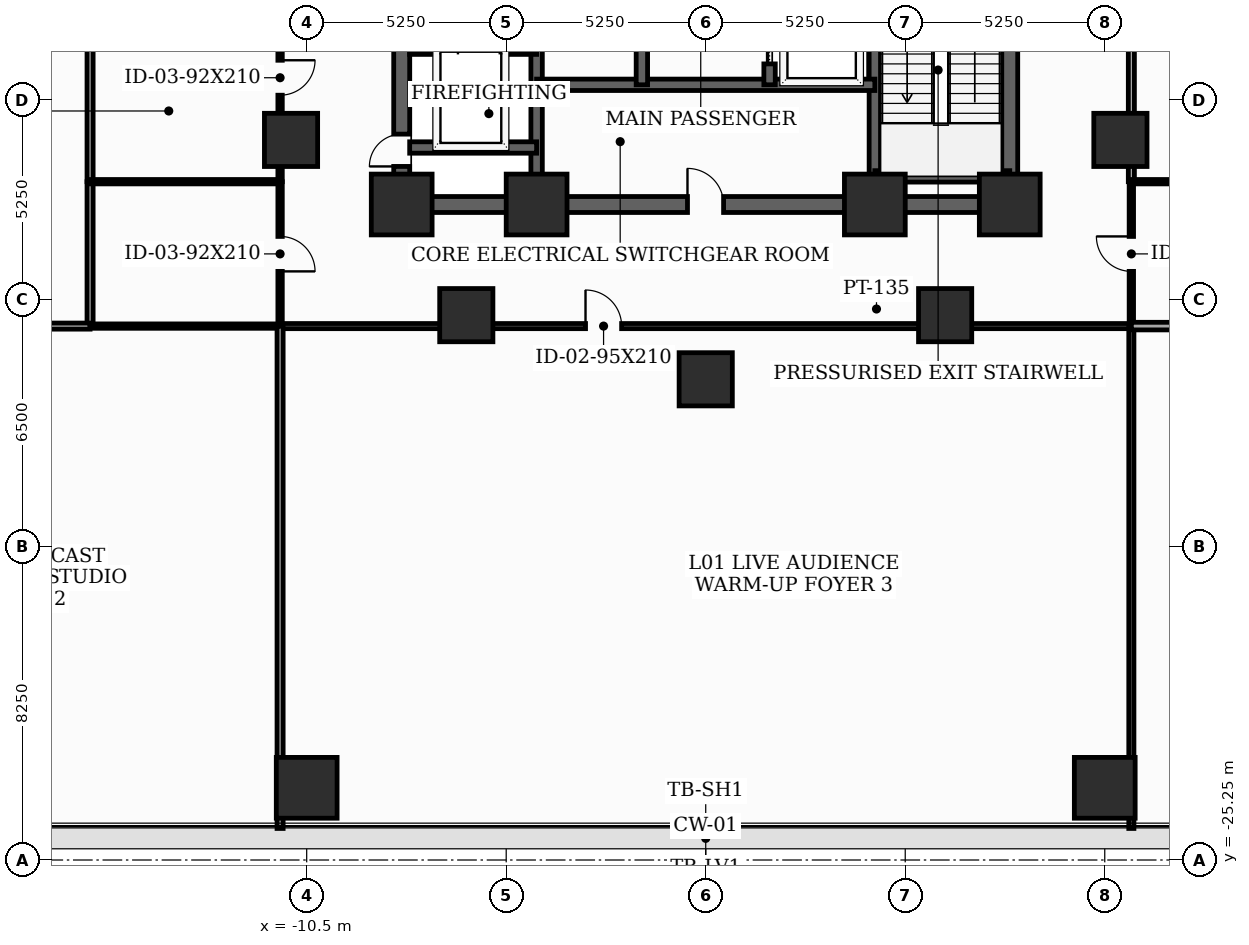
"""IFC4 building model, lengths in metres.
Left out: names, types, materials, properties, quantities, classifications, styles, units other than length and angle.
Written with IfcOpenShell. Run it as: python <this file> out.ifc"""

import sys

from ifc_helpers import new_model, si_unit, direction, frame, frame_2d, origin, origin_2d, place, context, subcontext, project, spatial, rectangle, extrude, element, fill, save


model = new_model("IFC4")
c1 = context("Model", 3, precision=1e-05, world=origin(), true_north=direction((0.0, 1.0)))
c2 = subcontext(c1, "Body", "Model", "MODEL_VIEW")
j1 = project(units=[si_unit("LENGTHUNIT", "METRE"), si_unit("PLANEANGLEUNIT", "RADIAN")], contexts=[c1])
p1 = place(None, origin())
s1 = spatial("IfcSite", under=j1, at=p1, CompositionType="ELEMENT")
p2 = place(p1, origin())
s2 = spatial("IfcBuilding", under=s1, at=p2, CompositionType="ELEMENT")
p3 = place(p2, frame((0.0, 0.0, 5.2)))
s3 = spatial("IfcBuildingStorey", under=s2, at=p3, CompositionType="ELEMENT", Elevation=5.2)
for number, where, z_axis, x_axis in (
    (1, (-8.0, -8.0, 0.0), (0.0, 0.0, 1.0), (1.0, 0.0, 0.0)),
    (2, (-4.45, -8.0, 0.0), (0.0, 0.0, 1.0), (1.0, 0.0, 0.0)),
    (3, (4.45, -8.0, 0.0), (0.0, 0.0, 1.0), (1.0, 0.0, 0.0)),
    (4, (8.0, -8.0, 0.0), (0.0, 0.0, 1.0), (1.0, 0.0, 0.0)),
):
    element("IfcColumn", number, at=place(p3, frame(where, z_axis=z_axis, x_axis=x_axis)), inside=s3, PredefinedType="COLUMN", context=c2, shape_type="SweptSolid", body=[
        extrude(rectangle(XDim=1.6, YDim=1.6, at=origin_2d()), origin(), (0.0, 0.0, 1.0), 5.2),
    ])
for number, where, z_axis, x_axis in (
    (5, (-10.912, -6.3, 0.0), (0.0, 0.0, 1.0), (1.0, 0.0, 0.0)),
    (6, (-6.3, -10.912, 0.0), (0.0, 0.0, 1.0), (1.0, 0.0, 0.0)),
    (7, (0.0, -12.6, 0.0), (0.0, 0.0, 1.0), (1.0, 0.0, 0.0)),
    (8, (6.3, -10.912, 0.0), (0.0, 0.0, 1.0), (1.0, 0.0, 0.0)),
    (9, (10.912, -6.3, 0.0), (0.0, 0.0, 1.0), (1.0, 0.0, 0.0)),
):
    element("IfcColumn", number, at=place(p3, frame(where, z_axis=z_axis, x_axis=x_axis)), inside=s3, PredefinedType="COLUMN", context=c2, shape_type="SweptSolid", body=[
        extrude(rectangle(XDim=1.4, YDim=1.4, at=origin_2d()), origin(), (0.0, 0.0, 1.0), 5.2),
    ])
for number, where, z_axis, x_axis in (
    (10, (-10.5, -23.35, 0.0), (0.0, 0.0, 1.0), (1.0, 0.0, 0.0)),
    (11, (10.5, -23.35, 0.0), (0.0, 0.0, 1.0), (1.0, 0.0, 0.0)),
):
    element("IfcColumn", number, at=place(p3, frame(where, z_axis=z_axis, x_axis=x_axis)), inside=s3, PredefinedType="COLUMN", context=c2, shape_type="SweptSolid", body=[
        extrude(rectangle(XDim=1.6, YDim=1.6, at=origin_2d()), origin(), (0.0, 0.0, 1.0), 5.2),
    ])
p4 = place(p3, frame((-8.0, -8.0, 0.0), z_axis=(0.0, 0.0, 1.0), x_axis=(0.0, 1.0, 0.0)))
e12 = element("IfcWall", 12, at=p4, inside=s3, PredefinedType="SHEAR", context=c2, shape_type="SweptSolid", body=[
    extrude(rectangle(XDim=16.0, YDim=0.42, at=frame_2d((8.0, 0.0))), origin(), (0.0, 0.0, 1.0), 4.95),
])
p5 = place(p4, frame((1.002, 0.0, 0.0)))
e13 = element("IfcOpeningElement", 13, at=p5, cuts=e12, PredefinedType="OPENING", context=c2, shape_type="SweptSolid", body=[
    extrude(rectangle(XDim=0.85, YDim=2.02, at=frame_2d((0.425, 1.01))), frame((0.0, 0.22, 0.0), z_axis=(0.0, -1.0, 0.0), x_axis=(1.0, 0.0, 0.0)), (0.0, 0.0, 1.0), 0.44),
])
p6 = place(p4, frame((5.35, 0.0, 0.0)))
e14 = element("IfcOpeningElement", 14, at=p6, cuts=e12, PredefinedType="OPENING", context=c2, shape_type="SweptSolid", body=[
    extrude(rectangle(XDim=1.05, YDim=2.15, at=frame_2d((0.525, 1.075))), frame((0.0, 0.22, 0.0), z_axis=(0.0, -1.0, 0.0), x_axis=(1.0, 0.0, 0.0)), (0.0, 0.0, 1.0), 0.44),
])
p7 = place(p3, frame((8.0, -8.0, 0.0), z_axis=(0.0, 0.0, 1.0), x_axis=(0.0, 1.0, 0.0)))
e15 = element("IfcWall", 15, at=p7, inside=s3, PredefinedType="SHEAR", context=c2, shape_type="SweptSolid", body=[
    extrude(rectangle(XDim=16.0, YDim=0.42, at=frame_2d((8.0, 0.0))), origin(), (0.0, 0.0, 1.0), 4.95),
])
p8 = place(p7, frame((9.6, 0.0, 0.0)))
e16 = element("IfcOpeningElement", 16, at=p8, cuts=e15, PredefinedType="OPENING", context=c2, shape_type="SweptSolid", body=[
    extrude(rectangle(XDim=1.05, YDim=2.15, at=frame_2d((0.525, 1.075))), frame((0.0, 0.22, 0.0), z_axis=(0.0, -1.0, 0.0), x_axis=(1.0, 0.0, 0.0)), (0.0, 0.0, 1.0), 0.44),
])
p9 = place(p7, frame((14.148, 0.0, 0.0)))
e17 = element("IfcOpeningElement", 17, at=p9, cuts=e15, PredefinedType="OPENING", context=c2, shape_type="SweptSolid", body=[
    extrude(rectangle(XDim=0.85, YDim=2.02, at=frame_2d((0.425, 1.01))), frame((0.0, 0.22, 0.0), z_axis=(0.0, -1.0, 0.0), x_axis=(1.0, 0.0, 0.0)), (0.0, 0.0, 1.0), 0.44),
])
p10 = place(p3, frame((-8.0, -8.0, 0.0), z_axis=(0.0, 0.0, 1.0), x_axis=(1.0, 0.0, 0.0)))
e18 = element("IfcWall", 18, at=p10, inside=s3, PredefinedType="SHEAR", context=c2, shape_type="SweptSolid", body=[
    extrude(rectangle(XDim=16.0, YDim=0.42, at=frame_2d((8.0, 0.0))), origin(), (0.0, 0.0, 1.0), 4.95),
])
p11 = place(p10, frame((7.52, 0.0, 0.0)))
e19 = element("IfcOpeningElement", 19, at=p11, cuts=e18, PredefinedType="OPENING", context=c2, shape_type="SweptSolid", body=[
    extrude(rectangle(XDim=0.95, YDim=2.1, at=frame_2d((0.475, 1.05))), frame((0.0, 0.22, 0.0), z_axis=(0.0, -1.0, 0.0), x_axis=(1.0, 0.0, 0.0)), (0.0, 0.0, 1.0), 0.44),
])
for number, where, z_axis, x_axis in (
    (20, (-4.45, -7.79, 0.0), (0.0, 0.0, 1.0), (0.0, 1.0, 0.0)),
    (21, (4.45, -7.79, 0.0), (0.0, 0.0, 1.0), (0.0, 1.0, 0.0)),
):
    element("IfcWall", number, at=place(p3, frame(where, z_axis=z_axis, x_axis=x_axis)), inside=s3, PredefinedType="SHEAR", context=c2, shape_type="SweptSolid", body=[
        extrude(rectangle(XDim=15.58, YDim=0.3, at=frame_2d((7.79, 0.0))), origin(), (0.0, 0.0, 1.0), 4.95),
    ])
p12 = place(p3, frame((4.45, -7.26, 0.0), z_axis=(0.0, 0.0, 1.0), x_axis=(1.0, 0.0, 0.0)))
e22 = element("IfcWall", 22, at=p12, inside=s3, PredefinedType="SHEAR", context=c2, shape_type="SweptSolid", body=[
    extrude(rectangle(XDim=3.55, YDim=0.3, at=frame_2d((1.775, 0.0))), origin(), (0.0, 0.0, 1.0), 4.95),
])
p13 = place(p3, frame((-7.79, -3.9, 0.0), z_axis=(0.0, 0.0, 1.0), x_axis=(1.0, 0.0, 0.0)))
e23 = element("IfcWall", 23, at=p13, inside=s3, PredefinedType="SHEAR", context=c2, shape_type="SweptSolid", body=[
    extrude(rectangle(XDim=3.34, YDim=0.3, at=frame_2d((1.67, 0.0))), origin(), (0.0, 0.0, 1.0), 4.95),
])
p14 = place(p13, frame((1.27, 0.0, 0.0)))
e24 = element("IfcOpeningElement", 24, at=p14, cuts=e23, PredefinedType="OPENING", context=c2, shape_type="SweptSolid", body=[
    extrude(rectangle(XDim=1.1, YDim=2.1, at=frame_2d((0.55, 1.05))), frame((0.0, 0.16, 0.0), z_axis=(0.0, -1.0, 0.0), x_axis=(1.0, 0.0, 0.0)), (0.0, 0.0, 1.0), 0.32),
])
p15 = place(p3, frame((-7.79, -6.5, 0.0), z_axis=(0.0, 0.0, 1.0), x_axis=(1.0, 0.0, 0.0)))
e25 = element("IfcWall", 25, at=p15, inside=s3, PredefinedType="SHEAR", context=c2, shape_type="SweptSolid", body=[
    extrude(rectangle(XDim=3.34, YDim=0.3, at=frame_2d((1.67, 0.0))), origin(), (0.0, 0.0, 1.0), 4.95),
])
p16 = place(p3, frame((-4.45, -4.85, 0.0), z_axis=(0.0, 0.0, 1.0), x_axis=(1.0, 0.0, 0.0)))
e26 = element("IfcWall", 26, at=p16, inside=s3, PredefinedType="SHEAR", context=c2, shape_type="SweptSolid", body=[
    extrude(rectangle(XDim=8.9, YDim=0.3, at=frame_2d((4.45, 0.0))), origin(), (0.0, 0.0, 1.0), 4.95),
])
p17 = place(p3, frame((-1.68, -4.85, 0.0), z_axis=(0.0, 0.0, 1.0), x_axis=(0.0, 1.0, 0.0)))
e27 = element("IfcWall", 27, at=p17, inside=s3, PredefinedType="SHEAR", context=c2, shape_type="SweptSolid", body=[
    extrude(rectangle(XDim=12.64, YDim=0.3, at=frame_2d((6.32, 0.0))), origin(), (0.0, 0.0, 1.0), 4.95),
])
p18 = place(p17, frame((3.95, 0.0, 0.0)))
e28 = element("IfcOpeningElement", 28, at=p18, cuts=e27, PredefinedType="OPENING", context=c2, shape_type="SweptSolid", body=[
    extrude(rectangle(XDim=1.1, YDim=2.1, at=frame_2d((0.55, 1.05))), frame((0.0, 0.16, 0.0), z_axis=(0.0, -1.0, 0.0), x_axis=(1.0, 0.0, 0.0)), (0.0, 0.0, 1.0), 0.32),
])
p19 = place(p17, frame((6.25, 0.0, 0.0)))
e29 = element("IfcOpeningElement", 29, at=p19, cuts=e27, PredefinedType="OPENING", context=c2, shape_type="SweptSolid", body=[
    extrude(rectangle(XDim=1.1, YDim=2.1, at=frame_2d((0.55, 1.05))), frame((0.0, 0.16, 0.0), z_axis=(0.0, -1.0, 0.0), x_axis=(1.0, 0.0, 0.0)), (0.0, 0.0, 1.0), 0.32),
])
p20 = place(p17, frame((8.55, 0.0, 0.0)))
e30 = element("IfcOpeningElement", 30, at=p20, cuts=e27, PredefinedType="OPENING", context=c2, shape_type="SweptSolid", body=[
    extrude(rectangle(XDim=1.1, YDim=2.1, at=frame_2d((0.55, 1.05))), frame((0.0, 0.16, 0.0), z_axis=(0.0, -1.0, 0.0), x_axis=(1.0, 0.0, 0.0)), (0.0, 0.0, 1.0), 0.32),
])
p21 = place(p17, frame((10.85, 0.0, 0.0)))
e31 = element("IfcOpeningElement", 31, at=p21, cuts=e27, PredefinedType="OPENING", context=c2, shape_type="SweptSolid", body=[
    extrude(rectangle(XDim=1.1, YDim=2.1, at=frame_2d((0.55, 1.05))), frame((0.0, 0.16, 0.0), z_axis=(0.0, -1.0, 0.0), x_axis=(1.0, 0.0, 0.0)), (0.0, 0.0, 1.0), 0.32),
])
p22 = place(p17, frame((1.15, 0.0, 0.0)))
e32 = element("IfcOpeningElement", 32, at=p22, cuts=e27, PredefinedType="OPENING", context=c2, shape_type="SweptSolid", body=[
    extrude(rectangle(XDim=0.92, YDim=2.1, at=frame_2d((0.46, 1.05))), frame((0.0, 0.16, 0.0), z_axis=(0.0, -1.0, 0.0), x_axis=(1.0, 0.0, 0.0)), (0.0, 0.0, 1.0), 0.32),
])
p23 = place(p3, frame((1.68, -4.85, 0.0), z_axis=(0.0, 0.0, 1.0), x_axis=(0.0, 1.0, 0.0)))
e33 = element("IfcWall", 33, at=p23, inside=s3, PredefinedType="SHEAR", context=c2, shape_type="SweptSolid", body=[
    extrude(rectangle(XDim=12.64, YDim=0.3, at=frame_2d((6.32, 0.0))), origin(), (0.0, 0.0, 1.0), 4.95),
])
p24 = place(p23, frame((0.55, 0.0, 0.0)))
e34 = element("IfcOpeningElement", 34, at=p24, cuts=e33, PredefinedType="OPENING", context=c2, shape_type="SweptSolid", body=[
    extrude(rectangle(XDim=1.1, YDim=2.1, at=frame_2d((0.55, 1.05))), frame((0.0, 0.16, 0.0), z_axis=(0.0, -1.0, 0.0), x_axis=(1.0, 0.0, 0.0)), (0.0, 0.0, 1.0), 0.32),
])
p25 = place(p23, frame((2.65, 0.0, 0.0)))
e35 = element("IfcOpeningElement", 35, at=p25, cuts=e33, PredefinedType="OPENING", context=c2, shape_type="SweptSolid", body=[
    extrude(rectangle(XDim=1.1, YDim=2.1, at=frame_2d((0.55, 1.05))), frame((0.0, 0.16, 0.0), z_axis=(0.0, -1.0, 0.0), x_axis=(1.0, 0.0, 0.0)), (0.0, 0.0, 1.0), 0.32),
])
p26 = place(p23, frame((4.75, 0.0, 0.0)))
e36 = element("IfcOpeningElement", 36, at=p26, cuts=e33, PredefinedType="OPENING", context=c2, shape_type="SweptSolid", body=[
    extrude(rectangle(XDim=1.1, YDim=2.1, at=frame_2d((0.55, 1.05))), frame((0.0, 0.16, 0.0), z_axis=(0.0, -1.0, 0.0), x_axis=(1.0, 0.0, 0.0)), (0.0, 0.0, 1.0), 0.32),
])
p27 = place(p23, frame((6.85, 0.0, 0.0)))
e37 = element("IfcOpeningElement", 37, at=p27, cuts=e33, PredefinedType="OPENING", context=c2, shape_type="SweptSolid", body=[
    extrude(rectangle(XDim=1.1, YDim=2.1, at=frame_2d((0.55, 1.05))), frame((0.0, 0.16, 0.0), z_axis=(0.0, -1.0, 0.0), x_axis=(1.0, 0.0, 0.0)), (0.0, 0.0, 1.0), 0.32),
])
p28 = place(p23, frame((8.95, 0.0, 0.0)))
e38 = element("IfcOpeningElement", 38, at=p28, cuts=e33, PredefinedType="OPENING", context=c2, shape_type="SweptSolid", body=[
    extrude(rectangle(XDim=1.1, YDim=2.1, at=frame_2d((0.55, 1.05))), frame((0.0, 0.16, 0.0), z_axis=(0.0, -1.0, 0.0), x_axis=(1.0, 0.0, 0.0)), (0.0, 0.0, 1.0), 0.32),
])
p29 = place(p23, frame((11.05, 0.0, 0.0)))
e39 = element("IfcOpeningElement", 39, at=p29, cuts=e33, PredefinedType="OPENING", context=c2, shape_type="SweptSolid", body=[
    extrude(rectangle(XDim=1.1, YDim=2.1, at=frame_2d((0.55, 1.05))), frame((0.0, 0.16, 0.0), z_axis=(0.0, -1.0, 0.0), x_axis=(1.0, 0.0, 0.0)), (0.0, 0.0, 1.0), 0.32),
])
p30 = place(p3, frame((-11.2, -3.6, 0.0), z_axis=(0.0, 0.0, 1.0), x_axis=(0.0, -1.0, 0.0)))
e40 = element("IfcWall", 40, at=p30, inside=s3, PredefinedType="PARTITIONING", context=c2, shape_type="SweptSolid", body=[
    extrude(rectangle(XDim=3.8, YDim=0.115, at=frame_2d((1.9, 0.0))), origin(), (0.0, 0.0, 1.0), 4.235),
])
p31 = place(p30, frame((0.604, 0.0, 0.0)))
e41 = element("IfcOpeningElement", 41, at=p31, cuts=e40, PredefinedType="OPENING", context=c2, shape_type="SweptSolid", body=[
    extrude(rectangle(XDim=0.92, YDim=2.1, at=frame_2d((0.46, 1.05))), frame((0.0, 0.067, 0.0), z_axis=(0.0, -1.0, 0.0), x_axis=(1.0, 0.0, 0.0)), (0.0, 0.0, 1.0), 0.135),
])
p32 = place(p3, frame((-11.2, -7.4, 0.0), z_axis=(0.0, 0.0, 1.0), x_axis=(0.0, -1.0, 0.0)))
e42 = element("IfcWall", 42, at=p32, inside=s3, PredefinedType="PARTITIONING", context=c2, shape_type="SweptSolid", body=[
    extrude(rectangle(XDim=3.8, YDim=0.115, at=frame_2d((1.9, 0.0))), origin(), (0.0, 0.0, 1.0), 4.95),
])
p33 = place(p32, frame((1.44, 0.0, 0.0)))
e43 = element("IfcOpeningElement", 43, at=p33, cuts=e42, PredefinedType="OPENING", context=c2, shape_type="SweptSolid", body=[
    extrude(rectangle(XDim=0.92, YDim=2.1, at=frame_2d((0.46, 1.05))), frame((0.0, 0.067, 0.0), z_axis=(0.0, -1.0, 0.0), x_axis=(1.0, 0.0, 0.0)), (0.0, 0.0, 1.0), 0.135),
])
p34 = place(p3, frame((-11.2, -11.2, 0.0), z_axis=(0.0, 0.0, 1.0), x_axis=(1.0, 0.0, 0.0)))
e44 = element("IfcWall", 44, at=p34, inside=s3, PredefinedType="PARTITIONING", context=c2, shape_type="SweptSolid", body=[
    extrude(rectangle(XDim=22.4, YDim=0.135, at=frame_2d((11.2, 0.0))), origin(), (0.0, 0.0, 1.0), 3.435),
])
p35 = place(p34, frame((8.037, 0.0, 0.0)))
e45 = element("IfcOpeningElement", 45, at=p35, cuts=e44, PredefinedType="OPENING", context=c2, shape_type="SweptSolid", body=[
    extrude(rectangle(XDim=0.95, YDim=2.1, at=frame_2d((0.475, 1.05))), frame((0.0, 0.077, 0.0), z_axis=(0.0, -1.0, 0.0), x_axis=(1.0, 0.0, 0.0)), (0.0, 0.0, 1.0), 0.155),
])
p36 = place(p3, frame((11.2, -11.2, 0.0), z_axis=(0.0, 0.0, 1.0), x_axis=(0.0, 1.0, 0.0)))
e46 = element("IfcWall", 46, at=p36, inside=s3, PredefinedType="PARTITIONING", context=c2, shape_type="SweptSolid", body=[
    extrude(rectangle(XDim=3.8, YDim=0.115, at=frame_2d((1.9, 0.0))), origin(), (0.0, 0.0, 1.0), 4.95),
])
p37 = place(p36, frame((1.44, 0.0, 0.0)))
e47 = element("IfcOpeningElement", 47, at=p37, cuts=e46, PredefinedType="OPENING", context=c2, shape_type="SweptSolid", body=[
    extrude(rectangle(XDim=0.92, YDim=2.1, at=frame_2d((0.46, 1.05))), frame((0.0, 0.067, 0.0), z_axis=(0.0, -1.0, 0.0), x_axis=(1.0, 0.0, 0.0)), (0.0, 0.0, 1.0), 0.135),
])
p38 = place(p3, frame((11.2, -7.4, 0.0), z_axis=(0.0, 0.0, 1.0), x_axis=(0.0, 1.0, 0.0)))
e48 = element("IfcWall", 48, at=p38, inside=s3, PredefinedType="PARTITIONING", context=c2, shape_type="SweptSolid", body=[
    extrude(rectangle(XDim=11.7, YDim=0.16, at=frame_2d((5.85, 0.0))), origin(), (0.0, 0.0, 1.0), 4.235),
])
p39 = place(p3, frame((-16.2, -7.4, 0.0), z_axis=(0.0, 0.0, 1.0), x_axis=(0.0, 1.0, 0.0)))
e49 = element("IfcWall", 49, at=p39, inside=s3, PredefinedType="PARTITIONING", context=c2, shape_type="SweptSolid", body=[
    extrude(rectangle(XDim=3.8, YDim=0.16, at=frame_2d((1.9, 0.0))), origin(), (0.0, 0.0, 1.0), 4.235),
])
p40 = place(p3, frame((-16.2, -11.2, 0.0), z_axis=(0.0, 0.0, 1.0), x_axis=(0.0, 1.0, 0.0)))
e50 = element("IfcWall", 50, at=p40, inside=s3, PredefinedType="PARTITIONING", context=c2, shape_type="SweptSolid", body=[
    extrude(rectangle(XDim=3.8, YDim=0.16, at=frame_2d((1.9, 0.0))), origin(), (0.0, 0.0, 1.0), 4.95),
])
p41 = place(p3, frame((-36.92, -11.2, 0.0), z_axis=(0.0, 0.0, 1.0), x_axis=(1.0, 0.0, 0.0)))
e51 = element("IfcWall", 51, at=p41, inside=s3, PredefinedType="PARTITIONING", context=c2, shape_type="SweptSolid", body=[
    extrude(rectangle(XDim=20.72, YDim=0.16, at=frame_2d((10.36, 0.0))), origin(), (0.0, 0.0, 1.0), 3.435),
])
p42 = place(p41, frame((9.9, 0.0, 0.0)))
e52 = element("IfcOpeningElement", 52, at=p42, cuts=e51, PredefinedType="OPENING", context=c2, shape_type="SweptSolid", body=[
    extrude(rectangle(XDim=0.92, YDim=2.1, at=frame_2d((0.46, 1.05))), frame((0.0, 0.09, 0.0), z_axis=(0.0, -1.0, 0.0), x_axis=(1.0, 0.0, 0.0)), (0.0, 0.0, 1.0), 0.18),
])
for number, where, z_axis, x_axis in (
    (53, (-16.2, -7.4, 0.0), (0.0, 0.0, 1.0), (1.0, 0.0, 0.0)),
    (54, (-16.2, -11.2, 0.0), (0.0, 0.0, 1.0), (1.0, 0.0, 0.0)),
):
    element("IfcWall", number, at=place(p3, frame(where, z_axis=z_axis, x_axis=x_axis)), inside=s3, PredefinedType="PARTITIONING", context=c2, shape_type="SweptSolid", body=[
        extrude(rectangle(XDim=5.0, YDim=0.115, at=frame_2d((2.5, 0.0))), origin(), (0.0, 0.0, 1.0), 4.95),
    ])
p43 = place(p3, frame((-11.2, -24.42, 0.0), z_axis=(0.0, 0.0, 1.0), x_axis=(0.0, 1.0, 0.0)))
e55 = element("IfcWall", 55, at=p43, inside=s3, PredefinedType="PARTITIONING", context=c2, shape_type="SweptSolid", body=[
    extrude(rectangle(XDim=13.22, YDim=0.16, at=frame_2d((6.61, 0.0))), origin(), (0.0, 0.0, 1.0), 3.435),
])
p44 = place(p3, frame((11.2, -24.42, 0.0), z_axis=(0.0, 0.0, 1.0), x_axis=(0.0, 1.0, 0.0)))
e56 = element("IfcWall", 56, at=p44, inside=s3, PredefinedType="PARTITIONING", context=c2, shape_type="SweptSolid", body=[
    extrude(rectangle(XDim=13.22, YDim=0.135, at=frame_2d((6.61, 0.0))), origin(), (0.0, 0.0, 1.0), 3.435),
])
p45 = place(p3, frame((15.6, -11.2, 0.0), z_axis=(0.0, 0.0, 1.0), x_axis=(-1.0, 0.0, 0.0)))
e57 = element("IfcWall", 57, at=p45, inside=s3, PredefinedType="SOLIDWALL", context=c2, shape_type="SweptSolid", body=[
    extrude(rectangle(XDim=4.4, YDim=0.2, at=frame_2d((2.2, 0.0))), origin(), (0.0, 0.0, 1.0), 4.95),
])
p46 = place(p3, frame((15.6, -7.4, 0.0), z_axis=(0.0, 0.0, 1.0), x_axis=(-1.0, 0.0, 0.0)))
e58 = element("IfcWall", 58, at=p46, inside=s3, PredefinedType="PARTITIONING", context=c2, shape_type="SweptSolid", body=[
    extrude(rectangle(XDim=4.4, YDim=0.115, at=frame_2d((2.2, 0.0))), origin(), (0.0, 0.0, 1.0), 4.95),
])
p47 = place(p5, origin())
e59 = element("IfcDoor", 59, at=p47, inside=s3, OperationType="SINGLE_SWING_LEFT", PredefinedType="TRAPDOOR", context=c2, shape_type="SweptSolid", body=[
    extrude(rectangle(XDim=0.85, YDim=2.02, at=frame_2d((0.425, 1.01))), frame((0.0, 0.025, 0.0), z_axis=(0.0, -1.0, 0.0), x_axis=(1.0, 0.0, 0.0)), (0.0, 0.0, 1.0), 0.05),
])
fill(e13, e59)
p48 = place(p11, origin())
e60 = element("IfcDoor", 60, at=p48, inside=s3, OperationType="SINGLE_SWING_LEFT", PredefinedType="DOOR", context=c2, shape_type="SweptSolid", body=[
    extrude(rectangle(XDim=0.95, YDim=2.1, at=frame_2d((0.475, 1.05))), frame((0.0, 0.025, 0.0), z_axis=(0.0, -1.0, 0.0), x_axis=(1.0, 0.0, 0.0)), (0.0, 0.0, 1.0), 0.05),
])
fill(e19, e60)
p49 = place(p24, origin())
e61 = element("IfcDoor", 61, at=p49, inside=s3, OperationType="SLIDING_TO_LEFT", PredefinedType="DOOR", context=c2, shape_type="SweptSolid", body=[
    extrude(rectangle(XDim=1.1, YDim=2.1, at=frame_2d((0.55, 1.05))), frame((0.0, 0.025, 0.0), z_axis=(0.0, -1.0, 0.0), x_axis=(1.0, 0.0, 0.0)), (0.0, 0.0, 1.0), 0.05),
])
fill(e34, e61)
p50 = place(p31, origin())
e62 = element("IfcDoor", 62, at=p50, inside=s3, OperationType="SINGLE_SWING_LEFT", PredefinedType="DOOR", context=c2, shape_type="SweptSolid", body=[
    extrude(rectangle(XDim=0.92, YDim=2.1, at=frame_2d((0.46, 1.05))), frame((0.0, 0.025, 0.0), z_axis=(0.0, -1.0, 0.0), x_axis=(1.0, 0.0, 0.0)), (0.0, 0.0, 1.0), 0.05),
])
fill(e41, e62)
p51 = place(p33, origin())
e63 = element("IfcDoor", 63, at=p51, inside=s3, OperationType="SINGLE_SWING_RIGHT", PredefinedType="DOOR", context=c2, shape_type="SweptSolid", body=[
    extrude(rectangle(XDim=0.92, YDim=2.1, at=frame_2d((0.46, 1.05))), frame((0.0, 0.025, 0.0), z_axis=(0.0, -1.0, 0.0), x_axis=(1.0, 0.0, 0.0)), (0.0, 0.0, 1.0), 0.05),
])
fill(e43, e63)
p52 = place(p35, origin())
e64 = element("IfcDoor", 64, at=p52, inside=s3, OperationType="SINGLE_SWING_LEFT", PredefinedType="DOOR", context=c2, shape_type="SweptSolid", body=[
    extrude(rectangle(XDim=0.95, YDim=2.1, at=frame_2d((0.475, 1.05))), frame((0.0, 0.025, 0.0), z_axis=(0.0, -1.0, 0.0), x_axis=(1.0, 0.0, 0.0)), (0.0, 0.0, 1.0), 0.05),
])
fill(e45, e64)
p53 = place(p37, origin())
e65 = element("IfcDoor", 65, at=p53, inside=s3, OperationType="SINGLE_SWING_RIGHT", PredefinedType="DOOR", context=c2, shape_type="SweptSolid", body=[
    extrude(rectangle(XDim=0.92, YDim=2.1, at=frame_2d((0.46, 1.05))), frame((0.0, 0.025, 0.0), z_axis=(0.0, -1.0, 0.0), x_axis=(1.0, 0.0, 0.0)), (0.0, 0.0, 1.0), 0.05),
])
fill(e47, e65)
save(model, sys.argv[1])
